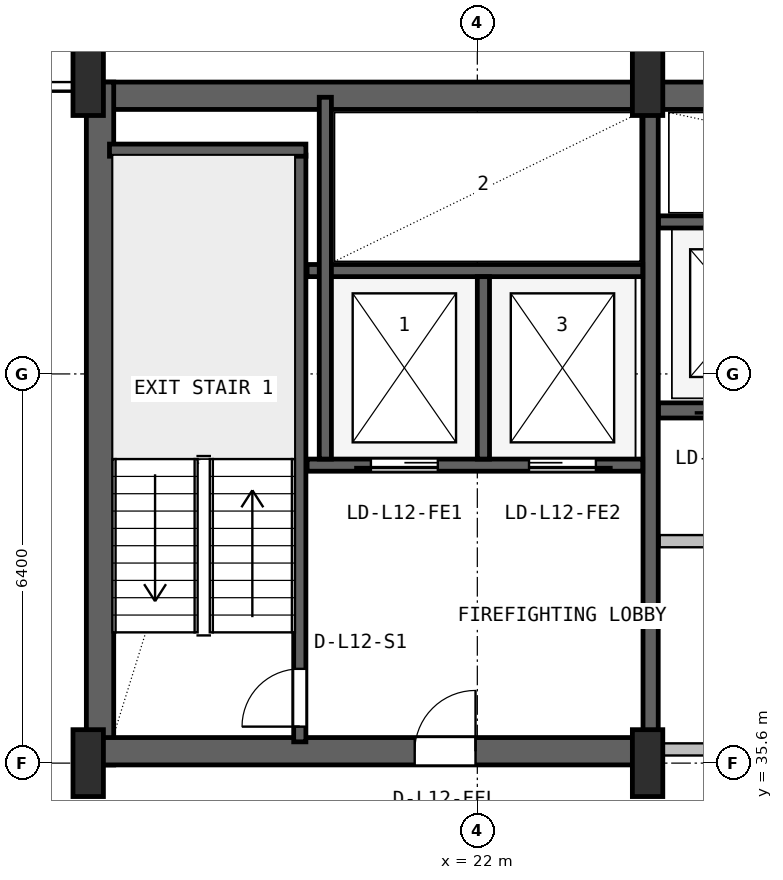
"""IFC4 building model, lengths in metres.
Left out: names, types, materials, properties, quantities, classifications, styles, units other than length and angle.
Written with IfcOpenShell. Run it as: python <this file> out.ifc"""

import sys

from ifc_helpers import new_model, si_unit, direction, frame, frame_2d, origin, origin_2d, place, context, subcontext, project, spatial, rectangle, i_section, extrude, source, transform, mapped, element, fill, save


model = new_model("IFC4")
c1 = context("Model", 3, precision=1e-05, world=origin(), true_north=direction((0.0, 1.0)))
c2 = subcontext(c1, "Body", "Model", "MODEL_VIEW")
j1 = project(units=[si_unit("LENGTHUNIT", "METRE"), si_unit("PLANEANGLEUNIT", "RADIAN")], contexts=[c1])
p1 = place(None, origin())
s1 = spatial("IfcSite", under=j1, at=p1, CompositionType="ELEMENT")
p2 = place(p1, origin())
s2 = spatial("IfcBuilding", under=s1, at=p2, CompositionType="ELEMENT")
p3 = place(p2, frame((0.0, 0.0, 54.9)))
s3 = spatial("IfcBuildingStorey", under=s2, at=p3, CompositionType="ELEMENT", Elevation=54.9)
p4 = place(p3, frame((15.6, 46.575, 0.0), z_axis=(0.0, 0.0, 1.0), x_axis=(1.0, 0.0, 0.0)))
e1 = element("IfcWall", 1, at=p4, inside=s3, PredefinedType="SHEAR", context=c2, shape_type="SweptSolid", body=[
    extrude(rectangle(XDim=36.8, YDim=0.45, at=frame_2d((18.4, 0.0))), origin(), (0.0, 0.0, 1.0), 3.65),
])
p5 = place(p3, frame((15.795, 35.57, 0.0), z_axis=(0.0, 0.0, 1.0), x_axis=(0.0, 1.0, 0.0)))
e2 = element("IfcWall", 2, at=p5, inside=s3, PredefinedType="SHEAR", context=c2, shape_type="SweptSolid", body=[
    extrude(rectangle(XDim=11.23, YDim=0.45, at=frame_2d((5.615, 0.0))), origin(), (0.0, 0.0, 1.0), 3.65),
])
p6 = place(p3, frame((15.57, 35.795, 0.0), z_axis=(0.0, 0.0, 1.0), x_axis=(1.0, 0.0, 0.0)))
e3 = element("IfcWall", 3, at=p6, inside=s3, PredefinedType="SHEAR", context=c2, shape_type="SweptSolid", body=[
    extrude(rectangle(XDim=9.23, YDim=0.45, at=frame_2d((4.615, 0.0))), origin(), (0.0, 0.0, 1.0), 3.65),
])
p7 = place(p6, frame((5.4, 0.0, 0.0)))
e4 = element("IfcOpeningElement", 4, at=p7, cuts=e3, PredefinedType="OPENING", context=c2, shape_type="SweptSolid", body=[
    extrude(rectangle(XDim=1.0, YDim=2.1, at=frame_2d((0.5, 1.05))), frame((0.0, 0.235, 0.0), z_axis=(0.0, -1.0, 0.0), x_axis=(1.0, 0.0, 0.0)), (0.0, 0.0, 1.0), 0.47),
])
m1 = source(origin(), c2, "Body", "SweptSolid", [
    extrude(i_section(OverallWidth=0.5, OverallDepth=1.1, WebThickness=0.018, FlangeThickness=0.032, FilletRadius=0.018, at=origin_2d()), origin(), (0.0, 0.0, 1.0), 3.9),
])
for number, where, z_axis, x_axis in (
    (5, (15.6, 35.6, 0.0), (0.0, 0.0, 1.0), (1.0, 0.0, 0.0)),
    (6, (15.6, 46.8, 0.0), (0.0, 0.0, 1.0), (1.0, 0.0, 0.0)),
    (7, (24.8, 35.6, 0.0), (0.0, 0.0, 1.0), (1.0, 0.0, 0.0)),
    (8, (24.8, 46.8, 0.0), (0.0, 0.0, 1.0), (1.0, 0.0, 0.0)),
):
    element("IfcColumn", number, at=place(p3, frame(where, z_axis=z_axis, x_axis=x_axis)), inside=s3, PredefinedType="COLUMN", context=c2, shape_type="MappedRepresentation", body=[
        mapped(m1, transform((0.0, 0.0, 0.0), x_axis=(1.0, 0.0, 0.0), y_axis=(0.0, 1.0, 0.0), z_axis=(0.0, 0.0, 1.0), scale=1.0)),
    ])
p8 = place(p3, frame((19.08, 35.95, 0.0), z_axis=(0.0, 0.0, 1.0), x_axis=(0.0, 1.0, 0.0)))
e9 = element("IfcWall", 9, at=p8, inside=s3, PredefinedType="SHEAR", context=c2, shape_type="SweptSolid", body=[
    extrude(rectangle(XDim=9.65, YDim=0.2, at=frame_2d((4.825, 0.0))), origin(), (0.0, 0.0, 1.0), 3.65),
])
p9 = place(p8, frame((0.25, 0.0, 0.0)))
e10 = element("IfcOpeningElement", 10, at=p9, cuts=e9, PredefinedType="OPENING", context=c2, shape_type="SweptSolid", body=[
    extrude(rectangle(XDim=0.95, YDim=2.1, at=frame_2d((0.475, 1.05))), frame((0.0, 0.11, 0.0), z_axis=(0.0, -1.0, 0.0), x_axis=(1.0, 0.0, 0.0)), (0.0, 0.0, 1.0), 0.22),
])
p10 = place(p3, frame((15.95, 45.68, 0.0), z_axis=(0.0, 0.0, 1.0), x_axis=(1.0, 0.0, 0.0)))
e11 = element("IfcWall", 11, at=p10, inside=s3, PredefinedType="SHEAR", context=c2, shape_type="SweptSolid", body=[
    extrude(rectangle(XDim=3.23, YDim=0.2, at=frame_2d((1.615, 0.0))), origin(), (0.0, 0.0, 1.0), 3.65),
])
p11 = place(p3, frame((24.85, 36.05, 0.0), z_axis=(0.0, 0.0, 1.0), x_axis=(0.0, 1.0, 0.0)))
e12 = element("IfcWall", 12, at=p11, inside=s3, PredefinedType="SHEAR", context=c2, shape_type="SweptSolid", body=[
    extrude(rectangle(XDim=10.45, YDim=0.25, at=frame_2d((5.225, 0.0))), origin(), (0.0, 0.0, 1.0), 3.65),
])
p12 = place(p3, frame((19.2, 40.5, 0.0), z_axis=(0.0, 0.0, 1.0), x_axis=(1.0, 0.0, 0.0)))
e13 = element("IfcWall", 13, at=p12, inside=s3, PredefinedType="SHEAR", context=c2, shape_type="SweptSolid", body=[
    extrude(rectangle(XDim=5.52, YDim=0.2, at=frame_2d((2.76, 0.0))), origin(), (0.0, 0.0, 1.0), 3.65),
])
p13 = place(p12, frame((1.05, 0.0, 0.0)))
e14 = element("IfcOpeningElement", 14, at=p13, cuts=e13, PredefinedType="OPENING", context=c2, shape_type="SweptSolid", body=[
    extrude(rectangle(XDim=1.1, YDim=2.18, at=frame_2d((0.55, 1.09))), frame((0.0, 0.11, 0.0), z_axis=(0.0, -1.0, 0.0), x_axis=(1.0, 0.0, 0.0)), (0.0, 0.0, 1.0), 0.22),
])
p14 = place(p12, frame((3.65, 0.0, 0.0)))
e15 = element("IfcOpeningElement", 15, at=p14, cuts=e13, PredefinedType="OPENING", context=c2, shape_type="SweptSolid", body=[
    extrude(rectangle(XDim=1.1, YDim=2.18, at=frame_2d((0.55, 1.09))), frame((0.0, 0.11, 0.0), z_axis=(0.0, -1.0, 0.0), x_axis=(1.0, 0.0, 0.0)), (0.0, 0.0, 1.0), 0.22),
])
p15 = place(p3, frame((19.2, 43.7, 0.0), z_axis=(0.0, 0.0, 1.0), x_axis=(1.0, 0.0, 0.0)))
e16 = element("IfcWall", 16, at=p15, inside=s3, PredefinedType="SHEAR", context=c2, shape_type="SweptSolid", body=[
    extrude(rectangle(XDim=5.52, YDim=0.2, at=frame_2d((2.76, 0.0))), origin(), (0.0, 0.0, 1.0), 3.65),
])
p16 = place(p3, frame((22.1, 40.6, 0.0), z_axis=(0.0, 0.0, 1.0), x_axis=(0.0, 1.0, 0.0)))
e17 = element("IfcWall", 17, at=p16, inside=s3, PredefinedType="SHEAR", context=c2, shape_type="SweptSolid", body=[
    extrude(rectangle(XDim=3.0, YDim=0.2, at=frame_2d((1.5, 0.0))), origin(), (0.0, 0.0, 1.0), 3.65),
])
p17 = place(p3, frame((19.5, 40.6, 0.0), z_axis=(0.0, 0.0, 1.0), x_axis=(0.0, 1.0, 0.0)))
e18 = element("IfcWall", 18, at=p17, inside=s3, PredefinedType="SHEAR", context=c2, shape_type="SweptSolid", body=[
    extrude(rectangle(XDim=5.95, YDim=0.2, at=frame_2d((2.975, 0.0))), origin(), (0.0, 0.0, 1.0), 3.65),
])
p18 = place(p3, frame((24.98, 41.4, 0.0), z_axis=(0.0, 0.0, 1.0), x_axis=(1.0, 0.0, 0.0)))
e19 = element("IfcWall", 19, at=p18, inside=s3, PredefinedType="SHEAR", context=c2, shape_type="SweptSolid", body=[
    extrude(rectangle(XDim=23.82, YDim=0.25, at=frame_2d((11.91, 0.0))), origin(), (0.0, 0.0, 1.0), 3.65),
])
p19 = place(p18, frame((0.87, 0.0, 0.0)))
e20 = element("IfcOpeningElement", 20, at=p19, cuts=e19, PredefinedType="OPENING", context=c2, shape_type="SweptSolid", body=[
    extrude(rectangle(XDim=1.1, YDim=2.18, at=frame_2d((0.55, 1.09))), frame((0.0, 0.135, 0.0), z_axis=(0.0, -1.0, 0.0), x_axis=(1.0, 0.0, 0.0)), (0.0, 0.0, 1.0), 0.27),
])
p20 = place(p18, frame((3.47, 0.0, 0.0)))
e21 = element("IfcOpeningElement", 21, at=p20, cuts=e19, PredefinedType="OPENING", context=c2, shape_type="SweptSolid", body=[
    extrude(rectangle(XDim=1.1, YDim=2.18, at=frame_2d((0.55, 1.09))), frame((0.0, 0.135, 0.0), z_axis=(0.0, -1.0, 0.0), x_axis=(1.0, 0.0, 0.0)), (0.0, 0.0, 1.0), 0.27),
])
p21 = place(p18, frame((6.07, 0.0, 0.0)))
e22 = element("IfcOpeningElement", 22, at=p21, cuts=e19, PredefinedType="OPENING", context=c2, shape_type="SweptSolid", body=[
    extrude(rectangle(XDim=1.1, YDim=2.18, at=frame_2d((0.55, 1.09))), frame((0.0, 0.135, 0.0), z_axis=(0.0, -1.0, 0.0), x_axis=(1.0, 0.0, 0.0)), (0.0, 0.0, 1.0), 0.27),
])
p22 = place(p3, frame((24.98, 44.5, 0.0), z_axis=(0.0, 0.0, 1.0), x_axis=(1.0, 0.0, 0.0)))
e23 = element("IfcWall", 23, at=p22, inside=s3, PredefinedType="SHEAR", context=c2, shape_type="SweptSolid", body=[
    extrude(rectangle(XDim=7.87, YDim=0.2, at=frame_2d((3.935, 0.0))), origin(), (0.0, 0.0, 1.0), 3.65),
])
p23 = place(p3, frame((25.0, 35.825, 0.0), z_axis=(0.0, 0.0, 1.0), x_axis=(1.0, 0.0, 0.0)))
e24 = element("IfcWall", 24, at=p23, inside=s3, PredefinedType="PLUMBINGWALL", context=c2, shape_type="SweptSolid", body=[
    extrude(rectangle(XDim=9.75, YDim=0.2, at=frame_2d((4.875, 0.0))), origin(), (0.0, 0.0, 1.0), 2.425),
])
p24 = place(p3, frame((25.0, 39.25, 0.0), z_axis=(0.0, 0.0, 1.0), x_axis=(1.0, 0.0, 0.0)))
e25 = element("IfcWall", 25, at=p24, inside=s3, PredefinedType="PLUMBINGWALL", context=c2, shape_type="SweptSolid", body=[
    extrude(rectangle(XDim=9.75, YDim=0.2, at=frame_2d((4.875, 0.0))), origin(), (0.0, 0.0, 1.0), 3.63),
])
p25 = place(p24, frame((1.75, 0.0, 0.0)))
e26 = element("IfcOpeningElement", 26, at=p25, cuts=e25, PredefinedType="OPENING", context=c2, shape_type="SweptSolid", body=[
    extrude(rectangle(XDim=0.9, YDim=2.06, at=frame_2d((0.45, 1.03))), frame((0.0, 0.11, 0.0), z_axis=(0.0, -1.0, 0.0), x_axis=(1.0, 0.0, 0.0)), (0.0, 0.0, 1.0), 0.22),
])
p26 = place(p24, frame((6.725, 0.0, 0.0)))
e27 = element("IfcOpeningElement", 27, at=p26, cuts=e25, PredefinedType="OPENING", context=c2, shape_type="SweptSolid", body=[
    extrude(rectangle(XDim=0.9, YDim=2.06, at=frame_2d((0.45, 1.03))), frame((0.0, 0.11, 0.0), z_axis=(0.0, -1.0, 0.0), x_axis=(1.0, 0.0, 0.0)), (0.0, 0.0, 1.0), 0.22),
])
m2 = source(origin(), c2, "Body", "SweptSolid", [
    extrude(rectangle(XDim=0.95, YDim=2.1, at=frame_2d((0.475, 1.05))), frame((0.0, 0.025, 0.0), z_axis=(0.0, -1.0, 0.0), x_axis=(1.0, 0.0, 0.0)), (0.0, 0.0, 1.0), 0.05),
])
p27 = place(p9, origin())
e28 = element("IfcDoor", 28, at=p27, inside=s3, OperationType="SINGLE_SWING_LEFT", PredefinedType="DOOR", context=c2, shape_type="MappedRepresentation", body=[
    mapped(m2, transform((0.0, 0.0, 0.0), x_axis=(1.0, 0.0, 0.0), y_axis=(0.0, 1.0, 0.0), z_axis=(0.0, 0.0, 1.0), scale=1.0)),
])
fill(e10, e28)
m3 = source(origin(), c2, "Body", "SweptSolid", [
    extrude(rectangle(XDim=1.0, YDim=2.1, at=frame_2d((0.5, 1.05))), frame((0.0, 0.025, 0.0), z_axis=(0.0, -1.0, 0.0), x_axis=(1.0, 0.0, 0.0)), (0.0, 0.0, 1.0), 0.05),
])
p28 = place(p7, origin())
e29 = element("IfcDoor", 29, at=p28, inside=s3, OperationType="SINGLE_SWING_RIGHT", PredefinedType="DOOR", context=c2, shape_type="MappedRepresentation", body=[
    mapped(m3, transform((0.0, 0.0, 0.0), x_axis=(1.0, 0.0, 0.0), y_axis=(0.0, 1.0, 0.0), z_axis=(0.0, 0.0, 1.0), scale=1.0)),
])
fill(e4, e29)
m4 = source(origin(), c2, "Body", "SweptSolid", [
    extrude(rectangle(XDim=1.1, YDim=2.18, at=frame_2d((0.55, 1.09))), frame((0.0, 0.025, 0.0), z_axis=(0.0, -1.0, 0.0), x_axis=(1.0, 0.0, 0.0)), (0.0, 0.0, 1.0), 0.05),
])
p29 = place(p13, frame((1.1, 0.0, 0.0), z_axis=(0.0, 0.0, 1.0), x_axis=(-1.0, 0.0, 0.0)))
e30 = element("IfcDoor", 30, at=p29, inside=s3, OperationType="SLIDING_TO_LEFT", PredefinedType="DOOR", context=c2, shape_type="MappedRepresentation", body=[
    mapped(m4, transform((0.0, 0.0, 0.0), x_axis=(1.0, 0.0, 0.0), y_axis=(0.0, 1.0, 0.0), z_axis=(0.0, 0.0, 1.0), scale=1.0)),
])
fill(e14, e30)
p30 = place(p14, frame((1.1, 0.0, 0.0), z_axis=(0.0, 0.0, 1.0), x_axis=(-1.0, 0.0, 0.0)))
e31 = element("IfcDoor", 31, at=p30, inside=s3, OperationType="SLIDING_TO_RIGHT", PredefinedType="DOOR", context=c2, shape_type="MappedRepresentation", body=[
    mapped(m4, transform((0.0, 0.0, 0.0), x_axis=(1.0, 0.0, 0.0), y_axis=(0.0, 1.0, 0.0), z_axis=(0.0, 0.0, 1.0), scale=1.0)),
])
fill(e15, e31)
save(model, sys.argv[1])
